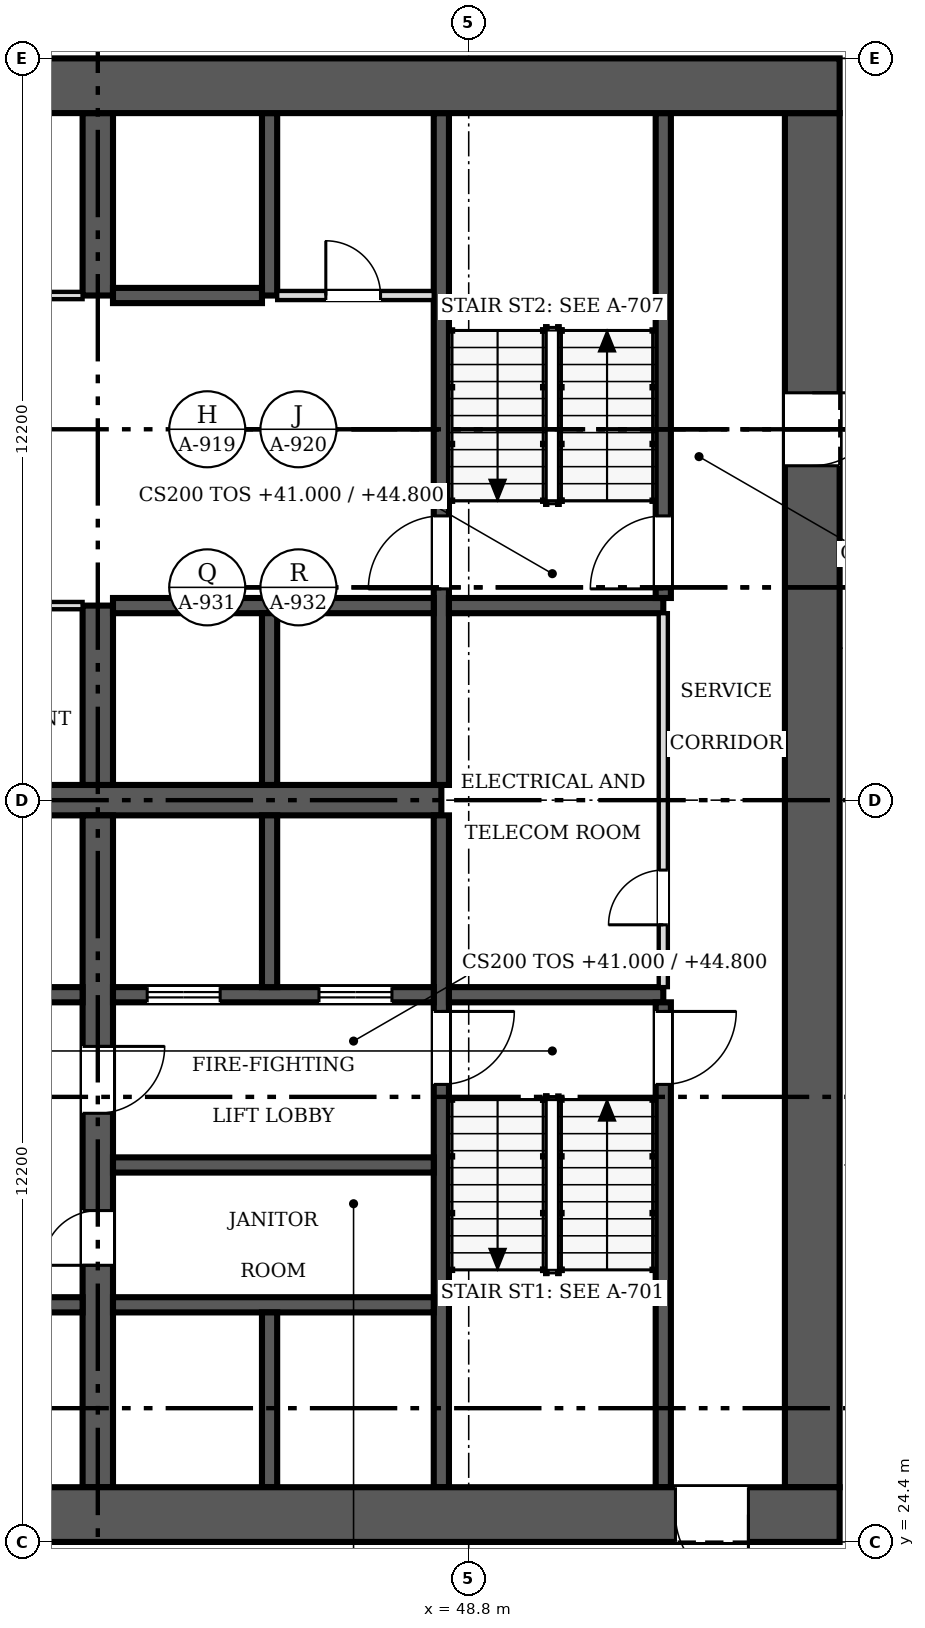
"""IFC4 building model, lengths in metres.
Left out: names, types, materials, properties, quantities, classifications, styles, units other than length and angle.
Written with IfcOpenShell. Run it as: python <this file> out.ifc"""

import sys

from ifc_helpers import new_model, si_unit, direction, frame, frame_2d, origin, place, context, subcontext, project, spatial, rectangle, extrude, source, transform, mapped, element, fill, save


model = new_model("IFC4")
c1 = context("Model", 3, precision=1e-05, world=origin(), true_north=direction((0.0, 1.0)))
c2 = subcontext(c1, "Body", "Model", "MODEL_VIEW")
j1 = project(units=[si_unit("LENGTHUNIT", "METRE"), si_unit("PLANEANGLEUNIT", "RADIAN")], contexts=[c1])
p1 = place(None, origin())
s1 = spatial("IfcSite", under=j1, at=p1, CompositionType="ELEMENT")
p2 = place(p1, origin())
s2 = spatial("IfcBuilding", under=s1, at=p2, CompositionType="ELEMENT")
p3 = place(p2, frame((0.0, 0.0, 41.0)))
s3 = spatial("IfcBuildingStorey", under=s2, at=p3, CompositionType="ELEMENT", Elevation=41.0)
p4 = place(p3, frame((54.9, 24.85, 0.0), z_axis=(0.0, 0.0, 1.0), x_axis=(-1.0, 0.0, 0.0)))
e1 = element("IfcWall", 1, at=p4, inside=s3, PredefinedType="SHEAR", context=c2, shape_type="SweptSolid", body=[
    extrude(rectangle(XDim=24.4, YDim=0.9, at=frame_2d((12.2, 0.0))), origin(), (0.0, 0.0, 1.0), 3.8),
])
m1 = source(origin(), c2, "Body", "SweptSolid", [
    extrude(rectangle(XDim=1.2, YDim=2.1, at=frame_2d((0.6, 1.05))), frame((0.0, 0.46, 0.0), z_axis=(0.0, -1.0, 0.0), x_axis=(1.0, 0.0, 0.0)), (0.0, 0.0, 1.0), 0.92),
])
p5 = place(p4, frame((1.5, 0.0, 0.0)))
e2 = element("IfcOpeningElement", 2, at=p5, cuts=e1, PredefinedType="OPENING", context=c2, shape_type="MappedRepresentation", body=[
    mapped(m1, transform((0.0, 0.0, 0.0), scale=1.0)),
])
p6 = place(p3, frame((30.5, 48.35, 0.0), z_axis=(0.0, 0.0, 1.0), x_axis=(1.0, 0.0, 0.0)))
e3 = element("IfcWall", 3, at=p6, inside=s3, PredefinedType="SHEAR", context=c2, shape_type="SweptSolid", body=[
    extrude(rectangle(XDim=24.4, YDim=0.9, at=frame_2d((12.2, 0.0))), origin(), (0.0, 0.0, 1.0), 3.8),
])
p7 = place(p3, frame((54.45, 47.9, 0.0), z_axis=(0.0, 0.0, 1.0), x_axis=(0.0, -1.0, 0.0)))
e4 = element("IfcWall", 4, at=p7, inside=s3, PredefinedType="SHEAR", context=c2, shape_type="SweptSolid", body=[
    extrude(rectangle(XDim=22.6, YDim=0.9, at=frame_2d((11.3, 0.0))), origin(), (0.0, 0.0, 1.0), 3.8),
])
p8 = place(p7, frame((4.6, 0.0, 0.0)))
e5 = element("IfcOpeningElement", 5, at=p8, cuts=e4, PredefinedType="OPENING", context=c2, shape_type="MappedRepresentation", body=[
    mapped(m1, transform((0.0, 0.0, 0.0), scale=1.0)),
])
p9 = place(p3, frame((31.4, 36.6, 0.0), z_axis=(0.0, 0.0, 1.0), x_axis=(1.0, 0.0, 0.0)))
e6 = element("IfcWall", 6, at=p9, inside=s3, PredefinedType="SHEAR", context=c2, shape_type="SweptSolid", body=[
    extrude(rectangle(XDim=16.95, YDim=0.5, at=frame_2d((8.475, 0.0))), origin(), (0.0, 0.0, 1.0), 3.8),
])
p10 = place(p3, frame((42.7, 36.35, 0.0), z_axis=(0.0, 0.0, 1.0), x_axis=(0.0, -1.0, 0.0)))
e7 = element("IfcWall", 7, at=p10, inside=s3, PredefinedType="SHEAR", context=c2, shape_type="SweptSolid", body=[
    extrude(rectangle(XDim=11.05, YDim=0.5, at=frame_2d((5.525, 0.0))), origin(), (0.0, 0.0, 1.0), 3.8),
])
m2 = source(origin(), c2, "Body", "SweptSolid", [
    extrude(rectangle(XDim=0.9, YDim=2.1, at=frame_2d((0.45, 1.05))), frame((0.0, 0.26, 0.0), z_axis=(0.0, -1.0, 0.0), x_axis=(1.0, 0.0, 0.0)), (0.0, 0.0, 1.0), 0.52),
])
p11 = place(p10, frame((6.5, 0.0, 0.0)))
e8 = element("IfcOpeningElement", 8, at=p11, cuts=e7, PredefinedType="OPENING", context=c2, shape_type="MappedRepresentation", body=[
    mapped(m2, transform((0.0, 0.0, 0.0), scale=1.0)),
])
m3 = source(origin(), c2, "Body", "SweptSolid", [
    extrude(rectangle(XDim=1.1, YDim=2.1, at=frame_2d((0.55, 1.05))), frame((0.0, 0.26, 0.0), z_axis=(0.0, -1.0, 0.0), x_axis=(1.0, 0.0, 0.0)), (0.0, 0.0, 1.0), 0.52),
])
p12 = place(p10, frame((3.8, 0.0, 0.0)))
e9 = element("IfcOpeningElement", 9, at=p12, cuts=e7, PredefinedType="OPENING", context=c2, shape_type="MappedRepresentation", body=[
    mapped(m3, transform((0.0, 0.0, 0.0), scale=1.0)),
])
p13 = place(p3, frame((42.7, 36.85, 0.0), z_axis=(0.0, 0.0, 1.0), x_axis=(0.0, 1.0, 0.0)))
e10 = element("IfcWall", 10, at=p13, inside=s3, PredefinedType="SHEAR", context=c2, shape_type="SweptSolid", body=[
    extrude(rectangle(XDim=2.95, YDim=0.5, at=frame_2d((1.475, 0.0))), origin(), (0.0, 0.0, 1.0), 3.8),
])
p14 = place(p3, frame((42.7, 44.9, 0.0), z_axis=(0.0, 0.0, 1.0), x_axis=(0.0, 1.0, 0.0)))
e11 = element("IfcWall", 11, at=p14, inside=s3, PredefinedType="SHEAR", context=c2, shape_type="SweptSolid", body=[
    extrude(rectangle(XDim=3.0, YDim=0.5, at=frame_2d((1.5, 0.0))), origin(), (0.0, 0.0, 1.0), 3.8),
])
p15 = place(p3, frame((48.35, 36.35, 0.0), z_axis=(0.0, 0.0, 1.0), x_axis=(0.0, -1.0, 0.0)))
e12 = element("IfcWall", 12, at=p15, inside=s3, PredefinedType="SOLIDWALL", context=c2, shape_type="SweptSolid", body=[
    extrude(rectangle(XDim=11.05, YDim=0.25, at=frame_2d((5.525, 0.0))), origin(), (0.0, 0.0, 1.0), 3.8),
])
m4 = source(origin(), c2, "Body", "SweptSolid", [
    extrude(rectangle(XDim=1.2, YDim=2.1, at=frame_2d((0.6, 1.05))), frame((0.0, 0.135, 0.0), z_axis=(0.0, -1.0, 0.0), x_axis=(1.0, 0.0, 0.0)), (0.0, 0.0, 1.0), 0.27),
])
p16 = place(p15, frame((3.225, 0.0, 0.0)))
e13 = element("IfcOpeningElement", 13, at=p16, cuts=e12, PredefinedType="OPENING", context=c2, shape_type="MappedRepresentation", body=[
    mapped(m4, transform((0.0, 0.0, 0.0), scale=1.0)),
])
p17 = place(p3, frame((48.35, 47.9, 0.0), z_axis=(0.0, 0.0, 1.0), x_axis=(0.0, -1.0, 0.0)))
e14 = element("IfcWall", 14, at=p17, inside=s3, PredefinedType="SOLIDWALL", context=c2, shape_type="SweptSolid", body=[
    extrude(rectangle(XDim=11.05, YDim=0.25, at=frame_2d((5.525, 0.0))), origin(), (0.0, 0.0, 1.0), 3.8),
])
p18 = place(p17, frame((6.625, 0.0, 0.0)))
e15 = element("IfcOpeningElement", 15, at=p18, cuts=e14, PredefinedType="OPENING", context=c2, shape_type="MappedRepresentation", body=[
    mapped(m4, transform((0.0, 0.0, 0.0), scale=1.0)),
])
p19 = place(p3, frame((42.45, 33.4, 0.0), z_axis=(0.0, 0.0, 1.0), x_axis=(-1.0, 0.0, 0.0)))
e16 = element("IfcWall", 16, at=p19, inside=s3, PredefinedType="SOLIDWALL", context=c2, shape_type="SweptSolid", body=[
    extrude(rectangle(XDim=11.05, YDim=0.25, at=frame_2d((5.525, 0.0))), origin(), (0.0, 0.0, 1.0), 3.8),
])
m5 = source(origin(), c2, "Body", "SweptSolid", [
    extrude(rectangle(XDim=1.1, YDim=2.1, at=frame_2d((0.55, 1.05))), frame((0.0, 0.135, 0.0), z_axis=(0.0, -1.0, 0.0), x_axis=(1.0, 0.0, 0.0)), (0.0, 0.0, 1.0), 0.27),
])
p20 = place(p19, frame((9.087, 0.0, 0.0)))
e17 = element("IfcOpeningElement", 17, at=p20, cuts=e16, PredefinedType="OPENING", context=c2, shape_type="MappedRepresentation", body=[
    mapped(m5, transform((0.0, 0.0, 0.0), scale=1.0)),
])
p21 = place(p19, frame((6.262, 0.0, 0.0)))
e18 = element("IfcOpeningElement", 18, at=p21, cuts=e16, PredefinedType="OPENING", context=c2, shape_type="MappedRepresentation", body=[
    mapped(m5, transform((0.0, 0.0, 0.0), scale=1.0)),
])
p22 = place(p19, frame((3.438, 0.0, 0.0)))
e19 = element("IfcOpeningElement", 19, at=p22, cuts=e16, PredefinedType="OPENING", context=c2, shape_type="MappedRepresentation", body=[
    mapped(m5, transform((0.0, 0.0, 0.0), scale=1.0)),
])
p23 = place(p19, frame((0.613, 0.0, 0.0)))
e20 = element("IfcOpeningElement", 20, at=p23, cuts=e16, PredefinedType="OPENING", context=c2, shape_type="MappedRepresentation", body=[
    mapped(m5, transform((0.0, 0.0, 0.0), scale=1.0)),
])
p24 = place(p3, frame((48.225, 33.4, 0.0), z_axis=(0.0, 0.0, 1.0), x_axis=(-1.0, 0.0, 0.0)))
e21 = element("IfcWall", 21, at=p24, inside=s3, PredefinedType="SOLIDWALL", context=c2, shape_type="SweptSolid", body=[
    extrude(rectangle(XDim=5.275, YDim=0.25, at=frame_2d((2.638, 0.0))), origin(), (0.0, 0.0, 1.0), 3.8),
])
p25 = place(p24, frame((3.512, 0.0, 0.0)))
e22 = element("IfcOpeningElement", 22, at=p25, cuts=e21, PredefinedType="OPENING", context=c2, shape_type="MappedRepresentation", body=[
    mapped(m4, transform((0.0, 0.0, 0.0), scale=1.0)),
])
p26 = place(p24, frame((0.688, 0.0, 0.0)))
e23 = element("IfcOpeningElement", 23, at=p26, cuts=e21, PredefinedType="OPENING", context=c2, shape_type="MappedRepresentation", body=[
    mapped(m4, transform((0.0, 0.0, 0.0), scale=1.0)),
])
p27 = place(p3, frame((48.475, 33.4, 0.0), z_axis=(0.0, 0.0, 1.0), x_axis=(1.0, 0.0, 0.0)))
e24 = element("IfcWall", 24, at=p27, inside=s3, PredefinedType="SOLIDWALL", context=c2, shape_type="SweptSolid", body=[
    extrude(rectangle(XDim=3.525, YDim=0.25, at=frame_2d((1.762, 0.0))), origin(), (0.0, 0.0, 1.0), 3.8),
])
p28 = place(p3, frame((31.4, 28.3, 0.0), z_axis=(0.0, 0.0, 1.0), x_axis=(1.0, 0.0, 0.0)))
e25 = element("IfcWall", 25, at=p28, inside=s3, PredefinedType="SOLIDWALL", context=c2, shape_type="SweptSolid", body=[
    extrude(rectangle(XDim=11.05, YDim=0.25, at=frame_2d((5.525, 0.0))), origin(), (0.0, 0.0, 1.0), 3.8),
])
p29 = place(p28, frame((0.863, 0.0, 0.0)))
e26 = element("IfcOpeningElement", 26, at=p29, cuts=e25, PredefinedType="OPENING", context=c2, shape_type="MappedRepresentation", body=[
    mapped(m5, transform((0.0, 0.0, 0.0), scale=1.0)),
])
p30 = place(p28, frame((3.688, 0.0, 0.0)))
e27 = element("IfcOpeningElement", 27, at=p30, cuts=e25, PredefinedType="OPENING", context=c2, shape_type="MappedRepresentation", body=[
    mapped(m5, transform((0.0, 0.0, 0.0), scale=1.0)),
])
p31 = place(p28, frame((6.512, 0.0, 0.0)))
e28 = element("IfcOpeningElement", 28, at=p31, cuts=e25, PredefinedType="OPENING", context=c2, shape_type="MappedRepresentation", body=[
    mapped(m5, transform((0.0, 0.0, 0.0), scale=1.0)),
])
p32 = place(p28, frame((9.337, 0.0, 0.0)))
e29 = element("IfcOpeningElement", 29, at=p32, cuts=e25, PredefinedType="OPENING", context=c2, shape_type="MappedRepresentation", body=[
    mapped(m5, transform((0.0, 0.0, 0.0), scale=1.0)),
])
for number, where, z_axis, x_axis in (
    (30, (42.95, 28.3, 0.0), (0.0, 0.0, 1.0), (1.0, 0.0, 0.0)),
    (31, (42.95, 39.8, 0.0), (0.0, 0.0, 1.0), (1.0, 0.0, 0.0)),
):
    element("IfcWall", number, at=place(p3, frame(where, z_axis=z_axis, x_axis=x_axis)), inside=s3, PredefinedType="SOLIDWALL", context=c2, shape_type="SweptSolid", body=[
        extrude(rectangle(XDim=5.275, YDim=0.25, at=frame_2d((2.638, 0.0))), origin(), (0.0, 0.0, 1.0), 3.8),
    ])
p33 = place(p3, frame((48.475, 39.8, 0.0), z_axis=(0.0, 0.0, 1.0), x_axis=(1.0, 0.0, 0.0)))
e32 = element("IfcWall", 32, at=p33, inside=s3, PredefinedType="SOLIDWALL", context=c2, shape_type="SweptSolid", body=[
    extrude(rectangle(XDim=3.525, YDim=0.25, at=frame_2d((1.762, 0.0))), origin(), (0.0, 0.0, 1.0), 3.8),
])
p34 = place(p3, frame((52.0, 25.3, 0.0), z_axis=(0.0, 0.0, 1.0), x_axis=(0.0, 1.0, 0.0)))
e33 = element("IfcWall", 33, at=p34, inside=s3, PredefinedType="SOLIDWALL", context=c2, shape_type="SweptSolid", body=[
    extrude(rectangle(XDim=7.975, YDim=0.25, at=frame_2d((3.987, 0.0))), origin(), (0.0, 0.0, 1.0), 3.8),
])
p35 = place(p34, frame((6.625, 0.0, 0.0)))
e34 = element("IfcOpeningElement", 34, at=p35, cuts=e33, PredefinedType="OPENING", context=c2, shape_type="MappedRepresentation", body=[
    mapped(m4, transform((0.0, 0.0, 0.0), scale=1.0)),
])
p36 = place(p3, frame((52.0, 39.925, 0.0), z_axis=(0.0, 0.0, 1.0), x_axis=(0.0, 1.0, 0.0)))
e35 = element("IfcWall", 35, at=p36, inside=s3, PredefinedType="SOLIDWALL", context=c2, shape_type="SweptSolid", body=[
    extrude(rectangle(XDim=7.975, YDim=0.25, at=frame_2d((3.987, 0.0))), origin(), (0.0, 0.0, 1.0), 3.8),
])
p37 = place(p36, frame((0.15, 0.0, 0.0)))
e36 = element("IfcOpeningElement", 36, at=p37, cuts=e35, PredefinedType="OPENING", context=c2, shape_type="MappedRepresentation", body=[
    mapped(m4, transform((0.0, 0.0, 0.0), scale=1.0)),
])
p38 = place(p3, frame((45.525, 33.525, 0.0), z_axis=(0.0, 0.0, 1.0), x_axis=(0.0, 1.0, 0.0)))
e37 = element("IfcWall", 37, at=p38, inside=s3, PredefinedType="SOLIDWALL", context=c2, shape_type="SweptSolid", body=[
    extrude(rectangle(XDim=2.825, YDim=0.25, at=frame_2d((1.413, 0.0))), origin(), (0.0, 0.0, 1.0), 3.8),
])
p39 = place(p3, frame((45.525, 36.85, 0.0), z_axis=(0.0, 0.0, 1.0), x_axis=(0.0, 1.0, 0.0)))
e38 = element("IfcWall", 38, at=p39, inside=s3, PredefinedType="SOLIDWALL", context=c2, shape_type="SweptSolid", body=[
    extrude(rectangle(XDim=2.825, YDim=0.25, at=frame_2d((1.413, 0.0))), origin(), (0.0, 0.0, 1.0), 3.8),
])
p40 = place(p3, frame((42.95, 30.6, 0.0), z_axis=(0.0, 0.0, 1.0), x_axis=(1.0, 0.0, 0.0)))
e39 = element("IfcWall", 39, at=p40, inside=s3, PredefinedType="SOLIDWALL", context=c2, shape_type="SweptSolid", body=[
    extrude(rectangle(XDim=5.275, YDim=0.25, at=frame_2d((2.638, 0.0))), origin(), (0.0, 0.0, 1.0), 3.8),
])
p41 = place(p3, frame((45.525, 25.3, 0.0), z_axis=(0.0, 0.0, 1.0), x_axis=(0.0, 1.0, 0.0)))
e40 = element("IfcWall", 40, at=p41, inside=s3, PredefinedType="SOLIDWALL", context=c2, shape_type="SweptSolid", body=[
    extrude(rectangle(XDim=2.875, YDim=0.25, at=frame_2d((1.438, 0.0))), origin(), (0.0, 0.0, 1.0), 3.8),
])
p42 = place(p3, frame((45.525, 44.9, 0.0), z_axis=(0.0, 0.0, 1.0), x_axis=(0.0, 1.0, 0.0)))
e41 = element("IfcWall", 41, at=p42, inside=s3, PredefinedType="SOLIDWALL", context=c2, shape_type="SweptSolid", body=[
    extrude(rectangle(XDim=3.0, YDim=0.25, at=frame_2d((1.5, 0.0))), origin(), (0.0, 0.0, 1.0), 3.8),
])
p43 = place(p3, frame((42.95, 44.9, 0.0), z_axis=(0.0, 0.0, 1.0), x_axis=(1.0, 0.0, 0.0)))
e42 = element("IfcWall", 42, at=p43, inside=s3, PredefinedType="SOLIDWALL", context=c2, shape_type="SweptSolid", body=[
    extrude(rectangle(XDim=2.45, YDim=0.25, at=frame_2d((1.225, 0.0))), origin(), (0.0, 0.0, 1.0), 3.8),
])
p44 = place(p3, frame((42.45, 39.8, 0.0), z_axis=(0.0, 0.0, 1.0), x_axis=(-1.0, 0.0, 0.0)))
e43 = element("IfcWall", 43, at=p44, inside=s3, PredefinedType="PARTITIONING", context=c2, shape_type="SweptSolid", body=[
    extrude(rectangle(XDim=11.05, YDim=0.12, at=frame_2d((5.525, 0.0))), origin(), (0.0, 0.0, 1.0), 3.6),
])
m6 = source(origin(), c2, "Body", "SweptSolid", [
    extrude(rectangle(XDim=0.9, YDim=2.1, at=frame_2d((0.45, 1.05))), frame((0.0, 0.07, 0.0), z_axis=(0.0, -1.0, 0.0), x_axis=(1.0, 0.0, 0.0)), (0.0, 0.0, 1.0), 0.14),
])
p45 = place(p44, frame((6.363, 0.0, 0.0)))
e44 = element("IfcOpeningElement", 44, at=p45, cuts=e43, PredefinedType="OPENING", context=c2, shape_type="MappedRepresentation", body=[
    mapped(m6, transform((0.0, 0.0, 0.0), scale=1.0)),
])
p46 = place(p44, frame((0.712, 0.0, 0.0)))
e45 = element("IfcOpeningElement", 45, at=p46, cuts=e43, PredefinedType="OPENING", context=c2, shape_type="MappedRepresentation", body=[
    mapped(m6, transform((0.0, 0.0, 0.0), scale=1.0)),
])
p47 = place(p3, frame((31.4, 44.9, 0.0), z_axis=(0.0, 0.0, 1.0), x_axis=(1.0, 0.0, 0.0)))
e46 = element("IfcWall", 46, at=p47, inside=s3, PredefinedType="PARTITIONING", context=c2, shape_type="SweptSolid", body=[
    extrude(rectangle(XDim=11.05, YDim=0.12, at=frame_2d((5.525, 0.0))), origin(), (0.0, 0.0, 1.0), 3.6),
])
p48 = place(p47, frame((0.962, 0.0, 0.0)))
e47 = element("IfcOpeningElement", 47, at=p48, cuts=e46, PredefinedType="OPENING", context=c2, shape_type="MappedRepresentation", body=[
    mapped(m6, transform((0.0, 0.0, 0.0), scale=1.0)),
])
p49 = place(p47, frame((6.613, 0.0, 0.0)))
e48 = element("IfcOpeningElement", 48, at=p49, cuts=e46, PredefinedType="OPENING", context=c2, shape_type="MappedRepresentation", body=[
    mapped(m6, transform((0.0, 0.0, 0.0), scale=1.0)),
])
p50 = place(p3, frame((52.0, 33.525, 0.0), z_axis=(0.0, 0.0, 1.0), x_axis=(0.0, 1.0, 0.0)))
e49 = element("IfcWall", 49, at=p50, inside=s3, PredefinedType="PARTITIONING", context=c2, shape_type="SweptSolid", body=[
    extrude(rectangle(XDim=6.15, YDim=0.15, at=frame_2d((3.075, 0.0))), origin(), (0.0, 0.0, 1.0), 3.6),
])
m7 = source(origin(), c2, "Body", "SweptSolid", [
    extrude(rectangle(XDim=0.9, YDim=2.1, at=frame_2d((0.45, 1.05))), frame((0.0, 0.085, 0.0), z_axis=(0.0, -1.0, 0.0), x_axis=(1.0, 0.0, 0.0)), (0.0, 0.0, 1.0), 0.17),
])
p51 = place(p50, frame((1.025, 0.0, 0.0)))
e50 = element("IfcOpeningElement", 50, at=p51, cuts=e49, PredefinedType="OPENING", context=c2, shape_type="MappedRepresentation", body=[
    mapped(m7, transform((0.0, 0.0, 0.0), scale=1.0)),
])
p52 = place(p3, frame((45.65, 44.9, 0.0), z_axis=(0.0, 0.0, 1.0), x_axis=(1.0, 0.0, 0.0)))
e51 = element("IfcWall", 51, at=p52, inside=s3, PredefinedType="PARTITIONING", context=c2, shape_type="SweptSolid", body=[
    extrude(rectangle(XDim=2.575, YDim=0.15, at=frame_2d((1.288, 0.0))), origin(), (0.0, 0.0, 1.0), 3.6),
])
p53 = place(p52, frame((0.8, 0.0, 0.0)))
e52 = element("IfcOpeningElement", 52, at=p53, cuts=e51, PredefinedType="OPENING", context=c2, shape_type="MappedRepresentation", body=[
    mapped(m7, transform((0.0, 0.0, 0.0), scale=1.0)),
])
m8 = source(origin(), c2, "Body", "SweptSolid", [
    extrude(rectangle(XDim=1.2, YDim=2.1, at=frame_2d((0.6, 1.05))), frame((0.0, 0.025, 0.0), z_axis=(0.0, -1.0, 0.0), x_axis=(1.0, 0.0, 0.0)), (0.0, 0.0, 1.0), 0.05),
])
p54 = place(p5, origin())
e53 = element("IfcDoor", 53, at=p54, inside=s3, OperationType="SINGLE_SWING_LEFT", PredefinedType="DOOR", context=c2, shape_type="MappedRepresentation", body=[
    mapped(m8, transform((0.0, 0.0, 0.0), scale=1.0)),
])
fill(e2, e53)
p55 = place(p8, origin())
e54 = element("IfcDoor", 54, at=p55, inside=s3, OperationType="SINGLE_SWING_LEFT", PredefinedType="DOOR", context=c2, shape_type="MappedRepresentation", body=[
    mapped(m8, transform((0.0, 0.0, 0.0), scale=1.0)),
])
fill(e5, e54)
m9 = source(origin(), c2, "Body", "SweptSolid", [
    extrude(rectangle(XDim=0.9, YDim=2.1, at=frame_2d((0.45, 1.05))), frame((0.0, 0.025, 0.0), z_axis=(0.0, -1.0, 0.0), x_axis=(1.0, 0.0, 0.0)), (0.0, 0.0, 1.0), 0.05),
])
p56 = place(p11, origin())
e55 = element("IfcDoor", 55, at=p56, inside=s3, OperationType="SINGLE_SWING_RIGHT", PredefinedType="DOOR", context=c2, shape_type="MappedRepresentation", body=[
    mapped(m9, transform((0.0, 0.0, 0.0), scale=1.0)),
])
fill(e8, e55)
m10 = source(origin(), c2, "Body", "SweptSolid", [
    extrude(rectangle(XDim=1.1, YDim=2.1, at=frame_2d((0.55, 1.05))), frame((0.0, 0.025, 0.0), z_axis=(0.0, -1.0, 0.0), x_axis=(1.0, 0.0, 0.0)), (0.0, 0.0, 1.0), 0.05),
])
p57 = place(p12, origin())
e56 = element("IfcDoor", 56, at=p57, inside=s3, OperationType="SINGLE_SWING_LEFT", PredefinedType="DOOR", context=c2, shape_type="MappedRepresentation", body=[
    mapped(m10, transform((0.0, 0.0, 0.0), scale=1.0)),
])
fill(e9, e56)
p58 = place(p16, origin())
e57 = element("IfcDoor", 57, at=p58, inside=s3, OperationType="SINGLE_SWING_LEFT", PredefinedType="DOOR", context=c2, shape_type="MappedRepresentation", body=[
    mapped(m8, transform((0.0, 0.0, 0.0), scale=1.0)),
])
fill(e13, e57)
p59 = place(p18, origin())
e58 = element("IfcDoor", 58, at=p59, inside=s3, OperationType="SINGLE_SWING_RIGHT", PredefinedType="DOOR", context=c2, shape_type="MappedRepresentation", body=[
    mapped(m8, transform((0.0, 0.0, 0.0), scale=1.0)),
])
fill(e15, e58)
p60 = place(p25, origin())
e59 = element("IfcDoor", 59, at=p60, inside=s3, OperationType="DOUBLE_DOOR_SLIDING", PredefinedType="DOOR", context=c2, shape_type="MappedRepresentation", body=[
    mapped(m8, transform((0.0, 0.0, 0.0), scale=1.0)),
])
fill(e22, e59)
p61 = place(p26, origin())
e60 = element("IfcDoor", 60, at=p61, inside=s3, OperationType="DOUBLE_DOOR_SLIDING", PredefinedType="DOOR", context=c2, shape_type="MappedRepresentation", body=[
    mapped(m8, transform((0.0, 0.0, 0.0), scale=1.0)),
])
fill(e23, e60)
p62 = place(p35, origin())
e61 = element("IfcDoor", 61, at=p62, inside=s3, OperationType="SINGLE_SWING_RIGHT", PredefinedType="DOOR", context=c2, shape_type="MappedRepresentation", body=[
    mapped(m8, transform((0.0, 0.0, 0.0), scale=1.0)),
])
fill(e34, e61)
p63 = place(p37, origin())
e62 = element("IfcDoor", 62, at=p63, inside=s3, OperationType="SINGLE_SWING_LEFT", PredefinedType="DOOR", context=c2, shape_type="MappedRepresentation", body=[
    mapped(m8, transform((0.0, 0.0, 0.0), scale=1.0)),
])
fill(e36, e62)
p64 = place(p51, origin())
e63 = element("IfcDoor", 63, at=p64, inside=s3, OperationType="SINGLE_SWING_LEFT", PredefinedType="DOOR", context=c2, shape_type="MappedRepresentation", body=[
    mapped(m9, transform((0.0, 0.0, 0.0), scale=1.0)),
])
fill(e50, e63)
p65 = place(p53, origin())
e64 = element("IfcDoor", 64, at=p65, inside=s3, OperationType="SINGLE_SWING_LEFT", PredefinedType="DOOR", context=c2, shape_type="MappedRepresentation", body=[
    mapped(m9, transform((0.0, 0.0, 0.0), scale=1.0)),
])
fill(e52, e64)
save(model, sys.argv[1])
